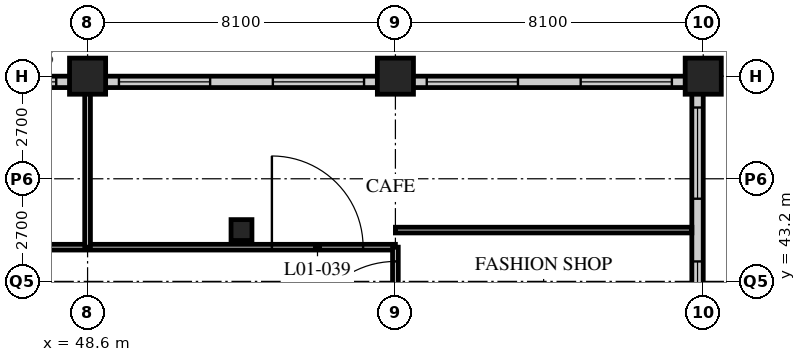
"""IFC4 building model, lengths in metres.
Left out: names, types, materials, properties, quantities, classifications, styles, units other than length and angle.
Written with IfcOpenShell. Run it as: python <this file> out.ifc"""

import sys

from ifc_helpers import new_model, si_unit, direction, frame, frame_2d, origin, origin_2d, place, context, subcontext, project, spatial, rectangle, hollow_rectangle, extrude, element, fill, save


model = new_model("IFC4")
c1 = context("Model", 3, precision=1e-05, world=origin(), true_north=direction((0.0, 1.0)))
c2 = subcontext(c1, "Body", "Model", "MODEL_VIEW")
j1 = project(units=[si_unit("LENGTHUNIT", "METRE"), si_unit("PLANEANGLEUNIT", "RADIAN")], contexts=[c1])
p1 = place(None, origin())
s1 = spatial("IfcSite", under=j1, at=p1, CompositionType="ELEMENT")
p2 = place(p1, origin())
s2 = spatial("IfcBuilding", under=s1, at=p2, CompositionType="ELEMENT")
p3 = place(p2, frame((0.0, 0.0, 6.0)))
s3 = spatial("IfcBuildingStorey", under=s2, at=p3, CompositionType="ELEMENT", Elevation=6.0)
p4 = place(p3, frame((48.6, 48.6, 0.0), z_axis=(0.0, 0.0, 1.0), x_axis=(1.0, 0.0, 0.0)))
e1 = element("IfcColumn", 1, at=p4, inside=s3, PredefinedType="COLUMN", context=c2, shape_type="SweptSolid", body=[
    extrude(hollow_rectangle(XDim=0.95, YDim=0.95, WallThickness=0.1, at=origin_2d()), origin(), (0.0, 0.0, 1.0), 5.4),
])
p5 = place(p3, frame((52.65, 44.55, 0.0), z_axis=(0.0, 0.0, 1.0), x_axis=(1.0, 0.0, 0.0)))
e2 = element("IfcColumn", 2, at=p5, inside=s3, PredefinedType="COLUMN", context=c2, shape_type="SweptSolid", body=[
    extrude(hollow_rectangle(XDim=0.55, YDim=0.55, WallThickness=0.05, at=origin_2d()), origin(), (0.0, 0.0, 1.0), 5.4),
])
for number, where, z_axis, x_axis in (
    (3, (56.7, 48.6, 0.0), (0.0, 0.0, 1.0), (1.0, 0.0, 0.0)),
    (4, (64.8, 48.6, 0.0), (0.0, 0.0, 1.0), (1.0, 0.0, 0.0)),
):
    element("IfcColumn", number, at=place(p3, frame(where, z_axis=z_axis, x_axis=x_axis)), inside=s3, PredefinedType="COLUMN", context=c2, shape_type="SweptSolid", body=[
        extrude(hollow_rectangle(XDim=0.95, YDim=0.95, WallThickness=0.1, at=origin_2d()), origin(), (0.0, 0.0, 1.0), 5.4),
    ])
p6 = place(p3, frame((64.65, -7.85, 0.0), z_axis=(0.0, 0.0, 1.0), x_axis=(0.0, 1.0, 0.0)))
e5 = element("IfcWall", 5, at=p6, inside=s3, PredefinedType="SOLIDWALL", context=c2, shape_type="SweptSolid", body=[
    extrude(rectangle(XDim=56.45, YDim=0.3, at=frame_2d((28.225, 0.0))), origin(), (0.0, 0.0, 1.0), 5.15),
])
p7 = place(p6, frame((0.575, 0.0, 1.0)))
e6 = element("IfcOpeningElement", 6, at=p7, cuts=e5, PredefinedType="OPENING", context=c2, shape_type="SweptSolid", body=[
    extrude(rectangle(XDim=2.4, YDim=2.75, at=frame_2d((1.2, 1.375))), frame((0.0, 0.16, 0.0), z_axis=(0.0, -1.0, 0.0), x_axis=(1.0, 0.0, 0.0)), (0.0, 0.0, 1.0), 0.32),
])
p8 = place(p6, frame((4.625, 0.0, 1.0)))
e7 = element("IfcOpeningElement", 7, at=p8, cuts=e5, PredefinedType="OPENING", context=c2, shape_type="SweptSolid", body=[
    extrude(rectangle(XDim=2.4, YDim=2.75, at=frame_2d((1.2, 1.375))), frame((0.0, 0.16, 0.0), z_axis=(0.0, -1.0, 0.0), x_axis=(1.0, 0.0, 0.0)), (0.0, 0.0, 1.0), 0.32),
])
p9 = place(p6, frame((8.675, 0.0, 1.0)))
e8 = element("IfcOpeningElement", 8, at=p9, cuts=e5, PredefinedType="OPENING", context=c2, shape_type="SweptSolid", body=[
    extrude(rectangle(XDim=2.4, YDim=2.75, at=frame_2d((1.2, 1.375))), frame((0.0, 0.16, 0.0), z_axis=(0.0, -1.0, 0.0), x_axis=(1.0, 0.0, 0.0)), (0.0, 0.0, 1.0), 0.32),
])
p10 = place(p6, frame((12.725, 0.0, 1.0)))
e9 = element("IfcOpeningElement", 9, at=p10, cuts=e5, PredefinedType="OPENING", context=c2, shape_type="SweptSolid", body=[
    extrude(rectangle(XDim=2.4, YDim=2.75, at=frame_2d((1.2, 1.375))), frame((0.0, 0.16, 0.0), z_axis=(0.0, -1.0, 0.0), x_axis=(1.0, 0.0, 0.0)), (0.0, 0.0, 1.0), 0.32),
])
p11 = place(p6, frame((16.775, 0.0, 1.0)))
e10 = element("IfcOpeningElement", 10, at=p11, cuts=e5, PredefinedType="OPENING", context=c2, shape_type="SweptSolid", body=[
    extrude(rectangle(XDim=2.4, YDim=2.75, at=frame_2d((1.2, 1.375))), frame((0.0, 0.16, 0.0), z_axis=(0.0, -1.0, 0.0), x_axis=(1.0, 0.0, 0.0)), (0.0, 0.0, 1.0), 0.32),
])
p12 = place(p6, frame((20.825, 0.0, 1.0)))
e11 = element("IfcOpeningElement", 11, at=p12, cuts=e5, PredefinedType="OPENING", context=c2, shape_type="SweptSolid", body=[
    extrude(rectangle(XDim=2.4, YDim=2.75, at=frame_2d((1.2, 1.375))), frame((0.0, 0.16, 0.0), z_axis=(0.0, -1.0, 0.0), x_axis=(1.0, 0.0, 0.0)), (0.0, 0.0, 1.0), 0.32),
])
p13 = place(p6, frame((24.875, 0.0, 1.0)))
e12 = element("IfcOpeningElement", 12, at=p13, cuts=e5, PredefinedType="OPENING", context=c2, shape_type="SweptSolid", body=[
    extrude(rectangle(XDim=2.4, YDim=2.75, at=frame_2d((1.2, 1.375))), frame((0.0, 0.16, 0.0), z_axis=(0.0, -1.0, 0.0), x_axis=(1.0, 0.0, 0.0)), (0.0, 0.0, 1.0), 0.32),
])
p14 = place(p6, frame((28.925, 0.0, 1.0)))
e13 = element("IfcOpeningElement", 13, at=p14, cuts=e5, PredefinedType="OPENING", context=c2, shape_type="SweptSolid", body=[
    extrude(rectangle(XDim=2.4, YDim=2.75, at=frame_2d((1.2, 1.375))), frame((0.0, 0.16, 0.0), z_axis=(0.0, -1.0, 0.0), x_axis=(1.0, 0.0, 0.0)), (0.0, 0.0, 1.0), 0.32),
])
p15 = place(p6, frame((32.975, 0.0, 1.0)))
e14 = element("IfcOpeningElement", 14, at=p15, cuts=e5, PredefinedType="OPENING", context=c2, shape_type="SweptSolid", body=[
    extrude(rectangle(XDim=2.4, YDim=2.75, at=frame_2d((1.2, 1.375))), frame((0.0, 0.16, 0.0), z_axis=(0.0, -1.0, 0.0), x_axis=(1.0, 0.0, 0.0)), (0.0, 0.0, 1.0), 0.32),
])
p16 = place(p6, frame((37.025, 0.0, 1.0)))
e15 = element("IfcOpeningElement", 15, at=p16, cuts=e5, PredefinedType="OPENING", context=c2, shape_type="SweptSolid", body=[
    extrude(rectangle(XDim=2.4, YDim=2.75, at=frame_2d((1.2, 1.375))), frame((0.0, 0.16, 0.0), z_axis=(0.0, -1.0, 0.0), x_axis=(1.0, 0.0, 0.0)), (0.0, 0.0, 1.0), 0.32),
])
p17 = place(p6, frame((41.075, 0.0, 1.0)))
e16 = element("IfcOpeningElement", 16, at=p17, cuts=e5, PredefinedType="OPENING", context=c2, shape_type="SweptSolid", body=[
    extrude(rectangle(XDim=2.4, YDim=2.75, at=frame_2d((1.2, 1.375))), frame((0.0, 0.16, 0.0), z_axis=(0.0, -1.0, 0.0), x_axis=(1.0, 0.0, 0.0)), (0.0, 0.0, 1.0), 0.32),
])
p18 = place(p6, frame((45.125, 0.0, 1.0)))
e17 = element("IfcOpeningElement", 17, at=p18, cuts=e5, PredefinedType="OPENING", context=c2, shape_type="SweptSolid", body=[
    extrude(rectangle(XDim=2.4, YDim=2.75, at=frame_2d((1.2, 1.375))), frame((0.0, 0.16, 0.0), z_axis=(0.0, -1.0, 0.0), x_axis=(1.0, 0.0, 0.0)), (0.0, 0.0, 1.0), 0.32),
])
p19 = place(p6, frame((49.175, 0.0, 1.0)))
e18 = element("IfcOpeningElement", 18, at=p19, cuts=e5, PredefinedType="OPENING", context=c2, shape_type="SweptSolid", body=[
    extrude(rectangle(XDim=2.4, YDim=2.75, at=frame_2d((1.2, 1.375))), frame((0.0, 0.16, 0.0), z_axis=(0.0, -1.0, 0.0), x_axis=(1.0, 0.0, 0.0)), (0.0, 0.0, 1.0), 0.32),
])
p20 = place(p6, frame((53.225, 0.0, 1.0)))
e19 = element("IfcOpeningElement", 19, at=p20, cuts=e5, PredefinedType="OPENING", context=c2, shape_type="SweptSolid", body=[
    extrude(rectangle(XDim=2.4, YDim=2.75, at=frame_2d((1.2, 1.375))), frame((0.0, 0.16, 0.0), z_axis=(0.0, -1.0, 0.0), x_axis=(1.0, 0.0, 0.0)), (0.0, 0.0, 1.0), 0.32),
])
p21 = place(p3, frame((64.5, 48.45, 0.0), z_axis=(0.0, 0.0, 1.0), x_axis=(-1.0, 0.0, 0.0)))
e20 = element("IfcWall", 20, at=p21, inside=s3, PredefinedType="SOLIDWALL", context=c2, shape_type="SweptSolid", body=[
    extrude(rectangle(XDim=72.6, YDim=0.3, at=frame_2d((36.3, 0.0))), origin(), (0.0, 0.0, 1.0), 5.15),
])
p22 = place(p21, frame((0.525, 0.0, 1.0)))
e21 = element("IfcOpeningElement", 21, at=p22, cuts=e20, PredefinedType="OPENING", context=c2, shape_type="SweptSolid", body=[
    extrude(rectangle(XDim=2.4, YDim=2.75, at=frame_2d((1.2, 1.375))), frame((0.0, 0.16, 0.0), z_axis=(0.0, -1.0, 0.0), x_axis=(1.0, 0.0, 0.0)), (0.0, 0.0, 1.0), 0.32),
])
p23 = place(p21, frame((4.575, 0.0, 1.0)))
e22 = element("IfcOpeningElement", 22, at=p23, cuts=e20, PredefinedType="OPENING", context=c2, shape_type="SweptSolid", body=[
    extrude(rectangle(XDim=2.4, YDim=2.75, at=frame_2d((1.2, 1.375))), frame((0.0, 0.16, 0.0), z_axis=(0.0, -1.0, 0.0), x_axis=(1.0, 0.0, 0.0)), (0.0, 0.0, 1.0), 0.32),
])
p24 = place(p21, frame((8.625, 0.0, 1.0)))
e23 = element("IfcOpeningElement", 23, at=p24, cuts=e20, PredefinedType="OPENING", context=c2, shape_type="SweptSolid", body=[
    extrude(rectangle(XDim=2.4, YDim=2.75, at=frame_2d((1.2, 1.375))), frame((0.0, 0.16, 0.0), z_axis=(0.0, -1.0, 0.0), x_axis=(1.0, 0.0, 0.0)), (0.0, 0.0, 1.0), 0.32),
])
p25 = place(p21, frame((12.675, 0.0, 1.0)))
e24 = element("IfcOpeningElement", 24, at=p25, cuts=e20, PredefinedType="OPENING", context=c2, shape_type="SweptSolid", body=[
    extrude(rectangle(XDim=2.4, YDim=2.75, at=frame_2d((1.2, 1.375))), frame((0.0, 0.16, 0.0), z_axis=(0.0, -1.0, 0.0), x_axis=(1.0, 0.0, 0.0)), (0.0, 0.0, 1.0), 0.32),
])
p26 = place(p21, frame((16.725, 0.0, 1.0)))
e25 = element("IfcOpeningElement", 25, at=p26, cuts=e20, PredefinedType="OPENING", context=c2, shape_type="SweptSolid", body=[
    extrude(rectangle(XDim=2.4, YDim=2.75, at=frame_2d((1.2, 1.375))), frame((0.0, 0.16, 0.0), z_axis=(0.0, -1.0, 0.0), x_axis=(1.0, 0.0, 0.0)), (0.0, 0.0, 1.0), 0.32),
])
p27 = place(p21, frame((20.775, 0.0, 1.0)))
e26 = element("IfcOpeningElement", 26, at=p27, cuts=e20, PredefinedType="OPENING", context=c2, shape_type="SweptSolid", body=[
    extrude(rectangle(XDim=2.4, YDim=2.75, at=frame_2d((1.2, 1.375))), frame((0.0, 0.16, 0.0), z_axis=(0.0, -1.0, 0.0), x_axis=(1.0, 0.0, 0.0)), (0.0, 0.0, 1.0), 0.32),
])
p28 = place(p21, frame((24.825, 0.0, 1.0)))
e27 = element("IfcOpeningElement", 27, at=p28, cuts=e20, PredefinedType="OPENING", context=c2, shape_type="SweptSolid", body=[
    extrude(rectangle(XDim=2.4, YDim=2.75, at=frame_2d((1.2, 1.375))), frame((0.0, 0.16, 0.0), z_axis=(0.0, -1.0, 0.0), x_axis=(1.0, 0.0, 0.0)), (0.0, 0.0, 1.0), 0.32),
])
p29 = place(p21, frame((28.875, 0.0, 1.0)))
e28 = element("IfcOpeningElement", 28, at=p29, cuts=e20, PredefinedType="OPENING", context=c2, shape_type="SweptSolid", body=[
    extrude(rectangle(XDim=2.4, YDim=2.75, at=frame_2d((1.2, 1.375))), frame((0.0, 0.16, 0.0), z_axis=(0.0, -1.0, 0.0), x_axis=(1.0, 0.0, 0.0)), (0.0, 0.0, 1.0), 0.32),
])
p30 = place(p21, frame((32.925, 0.0, 1.0)))
e29 = element("IfcOpeningElement", 29, at=p30, cuts=e20, PredefinedType="OPENING", context=c2, shape_type="SweptSolid", body=[
    extrude(rectangle(XDim=2.4, YDim=2.75, at=frame_2d((1.2, 1.375))), frame((0.0, 0.16, 0.0), z_axis=(0.0, -1.0, 0.0), x_axis=(1.0, 0.0, 0.0)), (0.0, 0.0, 1.0), 0.32),
])
p31 = place(p21, frame((36.975, 0.0, 1.0)))
e30 = element("IfcOpeningElement", 30, at=p31, cuts=e20, PredefinedType="OPENING", context=c2, shape_type="SweptSolid", body=[
    extrude(rectangle(XDim=2.4, YDim=2.75, at=frame_2d((1.2, 1.375))), frame((0.0, 0.16, 0.0), z_axis=(0.0, -1.0, 0.0), x_axis=(1.0, 0.0, 0.0)), (0.0, 0.0, 1.0), 0.32),
])
p32 = place(p21, frame((41.025, 0.0, 1.0)))
e31 = element("IfcOpeningElement", 31, at=p32, cuts=e20, PredefinedType="OPENING", context=c2, shape_type="SweptSolid", body=[
    extrude(rectangle(XDim=2.4, YDim=2.75, at=frame_2d((1.2, 1.375))), frame((0.0, 0.16, 0.0), z_axis=(0.0, -1.0, 0.0), x_axis=(1.0, 0.0, 0.0)), (0.0, 0.0, 1.0), 0.32),
])
p33 = place(p21, frame((45.075, 0.0, 1.0)))
e32 = element("IfcOpeningElement", 32, at=p33, cuts=e20, PredefinedType="OPENING", context=c2, shape_type="SweptSolid", body=[
    extrude(rectangle(XDim=2.4, YDim=2.75, at=frame_2d((1.2, 1.375))), frame((0.0, 0.16, 0.0), z_axis=(0.0, -1.0, 0.0), x_axis=(1.0, 0.0, 0.0)), (0.0, 0.0, 1.0), 0.32),
])
p34 = place(p21, frame((49.125, 0.0, 1.0)))
e33 = element("IfcOpeningElement", 33, at=p34, cuts=e20, PredefinedType="OPENING", context=c2, shape_type="SweptSolid", body=[
    extrude(rectangle(XDim=2.4, YDim=2.75, at=frame_2d((1.2, 1.375))), frame((0.0, 0.16, 0.0), z_axis=(0.0, -1.0, 0.0), x_axis=(1.0, 0.0, 0.0)), (0.0, 0.0, 1.0), 0.32),
])
p35 = place(p21, frame((53.175, 0.0, 1.0)))
e34 = element("IfcOpeningElement", 34, at=p35, cuts=e20, PredefinedType="OPENING", context=c2, shape_type="SweptSolid", body=[
    extrude(rectangle(XDim=2.4, YDim=2.75, at=frame_2d((1.2, 1.375))), frame((0.0, 0.16, 0.0), z_axis=(0.0, -1.0, 0.0), x_axis=(1.0, 0.0, 0.0)), (0.0, 0.0, 1.0), 0.32),
])
p36 = place(p21, frame((57.225, 0.0, 1.0)))
e35 = element("IfcOpeningElement", 35, at=p36, cuts=e20, PredefinedType="OPENING", context=c2, shape_type="SweptSolid", body=[
    extrude(rectangle(XDim=2.4, YDim=2.75, at=frame_2d((1.2, 1.375))), frame((0.0, 0.16, 0.0), z_axis=(0.0, -1.0, 0.0), x_axis=(1.0, 0.0, 0.0)), (0.0, 0.0, 1.0), 0.32),
])
p37 = place(p21, frame((61.275, 0.0, 1.0)))
e36 = element("IfcOpeningElement", 36, at=p37, cuts=e20, PredefinedType="OPENING", context=c2, shape_type="SweptSolid", body=[
    extrude(rectangle(XDim=2.4, YDim=2.75, at=frame_2d((1.2, 1.375))), frame((0.0, 0.16, 0.0), z_axis=(0.0, -1.0, 0.0), x_axis=(1.0, 0.0, 0.0)), (0.0, 0.0, 1.0), 0.32),
])
p38 = place(p21, frame((65.325, 0.0, 1.0)))
e37 = element("IfcOpeningElement", 37, at=p38, cuts=e20, PredefinedType="OPENING", context=c2, shape_type="SweptSolid", body=[
    extrude(rectangle(XDim=2.4, YDim=2.75, at=frame_2d((1.2, 1.375))), frame((0.0, 0.16, 0.0), z_axis=(0.0, -1.0, 0.0), x_axis=(1.0, 0.0, 0.0)), (0.0, 0.0, 1.0), 0.32),
])
p39 = place(p21, frame((69.375, 0.0, 1.0)))
e38 = element("IfcOpeningElement", 38, at=p39, cuts=e20, PredefinedType="OPENING", context=c2, shape_type="SweptSolid", body=[
    extrude(rectangle(XDim=2.4, YDim=2.75, at=frame_2d((1.2, 1.375))), frame((0.0, 0.16, 0.0), z_axis=(0.0, -1.0, 0.0), x_axis=(1.0, 0.0, 0.0)), (0.0, 0.0, 1.0), 0.32),
])
p40 = place(p3, frame((0.0, 44.1, 0.0), z_axis=(0.0, 0.0, 1.0), x_axis=(1.0, 0.0, 0.0)))
e39 = element("IfcWall", 39, at=p40, inside=s3, PredefinedType="PARTITIONING", context=c2, shape_type="SweptSolid", body=[
    extrude(rectangle(XDim=56.7, YDim=0.15, at=frame_2d((28.35, 0.0))), origin(), (0.0, 0.0, 1.0), 5.15),
])
p41 = place(p40, frame((10.95, 0.0, 0.0)))
e40 = element("IfcOpeningElement", 40, at=p41, cuts=e39, PredefinedType="OPENING", context=c2, shape_type="SweptSolid", body=[
    extrude(rectangle(XDim=2.4, YDim=2.7, at=frame_2d((1.2, 1.35))), frame((0.0, 0.085, 0.0), z_axis=(0.0, -1.0, 0.0), x_axis=(1.0, 0.0, 0.0)), (0.0, 0.0, 1.0), 0.17),
])
p42 = place(p40, frame((19.05, 0.0, 0.0)))
e41 = element("IfcOpeningElement", 41, at=p42, cuts=e39, PredefinedType="OPENING", context=c2, shape_type="SweptSolid", body=[
    extrude(rectangle(XDim=2.4, YDim=2.7, at=frame_2d((1.2, 1.35))), frame((0.0, 0.085, 0.0), z_axis=(0.0, -1.0, 0.0), x_axis=(1.0, 0.0, 0.0)), (0.0, 0.0, 1.0), 0.17),
])
p43 = place(p40, frame((27.15, 0.0, 0.0)))
e42 = element("IfcOpeningElement", 42, at=p43, cuts=e39, PredefinedType="OPENING", context=c2, shape_type="SweptSolid", body=[
    extrude(rectangle(XDim=2.4, YDim=2.7, at=frame_2d((1.2, 1.35))), frame((0.0, 0.085, 0.0), z_axis=(0.0, -1.0, 0.0), x_axis=(1.0, 0.0, 0.0)), (0.0, 0.0, 1.0), 0.17),
])
p44 = place(p40, frame((35.25, 0.0, 0.0)))
e43 = element("IfcOpeningElement", 43, at=p44, cuts=e39, PredefinedType="OPENING", context=c2, shape_type="SweptSolid", body=[
    extrude(rectangle(XDim=2.4, YDim=2.7, at=frame_2d((1.2, 1.35))), frame((0.0, 0.085, 0.0), z_axis=(0.0, -1.0, 0.0), x_axis=(1.0, 0.0, 0.0)), (0.0, 0.0, 1.0), 0.17),
])
p45 = place(p40, frame((43.35, 0.0, 0.0)))
e44 = element("IfcOpeningElement", 44, at=p45, cuts=e39, PredefinedType="OPENING", context=c2, shape_type="SweptSolid", body=[
    extrude(rectangle(XDim=2.4, YDim=2.7, at=frame_2d((1.2, 1.35))), frame((0.0, 0.085, 0.0), z_axis=(0.0, -1.0, 0.0), x_axis=(1.0, 0.0, 0.0)), (0.0, 0.0, 1.0), 0.17),
])
p46 = place(p40, frame((53.45, 0.0, 0.0)))
e45 = element("IfcOpeningElement", 45, at=p46, cuts=e39, PredefinedType="OPENING", context=c2, shape_type="SweptSolid", body=[
    extrude(rectangle(XDim=2.4, YDim=2.7, at=frame_2d((1.2, 1.35))), frame((0.0, 0.085, 0.0), z_axis=(0.0, -1.0, 0.0), x_axis=(1.0, 0.0, 0.0)), (0.0, 0.0, 1.0), 0.17),
])
p47 = place(p40, frame((4.85, 0.0, 0.0)))
e46 = element("IfcOpeningElement", 46, at=p47, cuts=e39, PredefinedType="OPENING", context=c2, shape_type="SweptSolid", body=[
    extrude(rectangle(XDim=2.4, YDim=2.7, at=frame_2d((1.2, 1.35))), frame((0.0, 0.085, 0.0), z_axis=(0.0, -1.0, 0.0), x_axis=(1.0, 0.0, 0.0)), (0.0, 0.0, 1.0), 0.17),
])
p48 = place(p3, frame((56.7, 0.0, 0.0), z_axis=(0.0, 0.0, 1.0), x_axis=(0.0, 1.0, 0.0)))
e47 = element("IfcWall", 47, at=p48, inside=s3, PredefinedType="PARTITIONING", context=c2, shape_type="SweptSolid", body=[
    extrude(rectangle(XDim=44.1, YDim=0.15, at=frame_2d((22.05, 0.0))), origin(), (0.0, 0.0, 1.0), 4.538),
])
p49 = place(p48, frame((2.85, 0.0, 0.0)))
e48 = element("IfcOpeningElement", 48, at=p49, cuts=e47, PredefinedType="OPENING", context=c2, shape_type="SweptSolid", body=[
    extrude(rectangle(XDim=2.4, YDim=2.7, at=frame_2d((1.2, 1.35))), frame((0.0, 0.085, 0.0), z_axis=(0.0, -1.0, 0.0), x_axis=(1.0, 0.0, 0.0)), (0.0, 0.0, 1.0), 0.17),
])
p50 = place(p48, frame((10.95, 0.0, 0.0)))
e49 = element("IfcOpeningElement", 49, at=p50, cuts=e47, PredefinedType="OPENING", context=c2, shape_type="SweptSolid", body=[
    extrude(rectangle(XDim=2.4, YDim=2.7, at=frame_2d((1.2, 1.35))), frame((0.0, 0.085, 0.0), z_axis=(0.0, -1.0, 0.0), x_axis=(1.0, 0.0, 0.0)), (0.0, 0.0, 1.0), 0.17),
])
p51 = place(p48, frame((19.05, 0.0, 0.0)))
e50 = element("IfcOpeningElement", 50, at=p51, cuts=e47, PredefinedType="OPENING", context=c2, shape_type="SweptSolid", body=[
    extrude(rectangle(XDim=2.4, YDim=2.7, at=frame_2d((1.2, 1.35))), frame((0.0, 0.085, 0.0), z_axis=(0.0, -1.0, 0.0), x_axis=(1.0, 0.0, 0.0)), (0.0, 0.0, 1.0), 0.17),
])
p52 = place(p48, frame((27.15, 0.0, 0.0)))
e51 = element("IfcOpeningElement", 51, at=p52, cuts=e47, PredefinedType="OPENING", context=c2, shape_type="SweptSolid", body=[
    extrude(rectangle(XDim=2.4, YDim=2.7, at=frame_2d((1.2, 1.35))), frame((0.0, 0.085, 0.0), z_axis=(0.0, -1.0, 0.0), x_axis=(1.0, 0.0, 0.0)), (0.0, 0.0, 1.0), 0.17),
])
p53 = place(p48, frame((35.25, 0.0, 0.0)))
e52 = element("IfcOpeningElement", 52, at=p53, cuts=e47, PredefinedType="OPENING", context=c2, shape_type="SweptSolid", body=[
    extrude(rectangle(XDim=2.4, YDim=2.7, at=frame_2d((1.2, 1.35))), frame((0.0, 0.085, 0.0), z_axis=(0.0, -1.0, 0.0), x_axis=(1.0, 0.0, 0.0)), (0.0, 0.0, 1.0), 0.17),
])
p54 = place(p48, frame((41.325, 0.0, 0.0)))
e53 = element("IfcOpeningElement", 53, at=p54, cuts=e47, PredefinedType="OPENING", context=c2, shape_type="SweptSolid", body=[
    extrude(rectangle(XDim=2.4, YDim=2.7, at=frame_2d((1.2, 1.35))), frame((0.0, 0.085, 0.0), z_axis=(0.0, -1.0, 0.0), x_axis=(1.0, 0.0, 0.0)), (0.0, 0.0, 1.0), 0.17),
])
p55 = place(p3, frame((56.7, 44.55, 0.0), z_axis=(0.0, 0.0, 1.0), x_axis=(1.0, 0.0, 0.0)))
e54 = element("IfcWall", 54, at=p55, inside=s3, PredefinedType="PARTITIONING", context=c2, shape_type="SweptSolid", body=[
    extrude(rectangle(XDim=7.8, YDim=0.15, at=frame_2d((3.9, 0.0))), origin(), (0.0, 0.0, 1.0), 5.15),
])
p56 = place(p3, frame((48.6, 44.1, 0.0), z_axis=(0.0, 0.0, 1.0), x_axis=(0.0, 1.0, 0.0)))
e55 = element("IfcWall", 55, at=p56, inside=s3, PredefinedType="PARTITIONING", context=c2, shape_type="SweptSolid", body=[
    extrude(rectangle(XDim=4.2, YDim=0.15, at=frame_2d((2.1, 0.0))), origin(), (0.0, 0.0, 1.0), 4.538),
])
p57 = place(p19, origin())
e56 = element("IfcWindow", 56, at=p57, inside=s3, PartitioningType="SINGLE_PANEL", PredefinedType="WINDOW", context=c2, shape_type="SweptSolid", body=[
    extrude(rectangle(XDim=2.4, YDim=2.75, at=frame_2d((1.2, 1.375))), frame((0.0, 0.03, 0.0), z_axis=(0.0, -1.0, 0.0), x_axis=(1.0, 0.0, 0.0)), (0.0, 0.0, 1.0), 0.06),
])
fill(e18, e56)
p58 = place(p20, origin())
e57 = element("IfcWindow", 57, at=p58, inside=s3, PartitioningType="SINGLE_PANEL", PredefinedType="WINDOW", context=c2, shape_type="SweptSolid", body=[
    extrude(rectangle(XDim=2.4, YDim=2.75, at=frame_2d((1.2, 1.375))), frame((0.0, 0.03, 0.0), z_axis=(0.0, -1.0, 0.0), x_axis=(1.0, 0.0, 0.0)), (0.0, 0.0, 1.0), 0.06),
])
fill(e19, e57)
p59 = place(p22, origin())
e58 = element("IfcWindow", 58, at=p59, inside=s3, PartitioningType="SINGLE_PANEL", PredefinedType="WINDOW", context=c2, shape_type="SweptSolid", body=[
    extrude(rectangle(XDim=2.4, YDim=2.75, at=frame_2d((1.2, 1.375))), frame((0.0, 0.03, 0.0), z_axis=(0.0, -1.0, 0.0), x_axis=(1.0, 0.0, 0.0)), (0.0, 0.0, 1.0), 0.06),
])
fill(e21, e58)
p60 = place(p23, origin())
e59 = element("IfcWindow", 59, at=p60, inside=s3, PartitioningType="SINGLE_PANEL", PredefinedType="WINDOW", context=c2, shape_type="SweptSolid", body=[
    extrude(rectangle(XDim=2.4, YDim=2.75, at=frame_2d((1.2, 1.375))), frame((0.0, 0.03, 0.0), z_axis=(0.0, -1.0, 0.0), x_axis=(1.0, 0.0, 0.0)), (0.0, 0.0, 1.0), 0.06),
])
fill(e22, e59)
p61 = place(p24, origin())
e60 = element("IfcWindow", 60, at=p61, inside=s3, PartitioningType="SINGLE_PANEL", PredefinedType="WINDOW", context=c2, shape_type="SweptSolid", body=[
    extrude(rectangle(XDim=2.4, YDim=2.75, at=frame_2d((1.2, 1.375))), frame((0.0, 0.03, 0.0), z_axis=(0.0, -1.0, 0.0), x_axis=(1.0, 0.0, 0.0)), (0.0, 0.0, 1.0), 0.06),
])
fill(e23, e60)
p62 = place(p25, origin())
e61 = element("IfcWindow", 61, at=p62, inside=s3, PartitioningType="SINGLE_PANEL", PredefinedType="WINDOW", context=c2, shape_type="SweptSolid", body=[
    extrude(rectangle(XDim=2.4, YDim=2.75, at=frame_2d((1.2, 1.375))), frame((0.0, 0.03, 0.0), z_axis=(0.0, -1.0, 0.0), x_axis=(1.0, 0.0, 0.0)), (0.0, 0.0, 1.0), 0.06),
])
fill(e24, e61)
p63 = place(p26, origin())
e62 = element("IfcWindow", 62, at=p63, inside=s3, PartitioningType="SINGLE_PANEL", PredefinedType="WINDOW", context=c2, shape_type="SweptSolid", body=[
    extrude(rectangle(XDim=2.4, YDim=2.75, at=frame_2d((1.2, 1.375))), frame((0.0, 0.03, 0.0), z_axis=(0.0, -1.0, 0.0), x_axis=(1.0, 0.0, 0.0)), (0.0, 0.0, 1.0), 0.06),
])
fill(e25, e62)
p64 = place(p54, origin())
e63 = element("IfcDoor", 63, at=p64, inside=s3, OperationType="DOUBLE_DOOR_SINGLE_SWING", PredefinedType="DOOR", context=c2, shape_type="SweptSolid", body=[
    extrude(rectangle(XDim=2.4, YDim=2.7, at=frame_2d((1.2, 1.35))), frame((0.0, 0.025, 0.0), z_axis=(0.0, -1.0, 0.0), x_axis=(1.0, 0.0, 0.0)), (0.0, 0.0, 1.0), 0.05),
])
fill(e53, e63)
p65 = place(p46, origin())
e64 = element("IfcDoor", 64, at=p65, inside=s3, OperationType="DOUBLE_DOOR_SINGLE_SWING", PredefinedType="DOOR", context=c2, shape_type="SweptSolid", body=[
    extrude(rectangle(XDim=2.4, YDim=2.7, at=frame_2d((1.2, 1.35))), frame((0.0, 0.025, 0.0), z_axis=(0.0, -1.0, 0.0), x_axis=(1.0, 0.0, 0.0)), (0.0, 0.0, 1.0), 0.05),
])
fill(e45, e64)
save(model, sys.argv[1])
